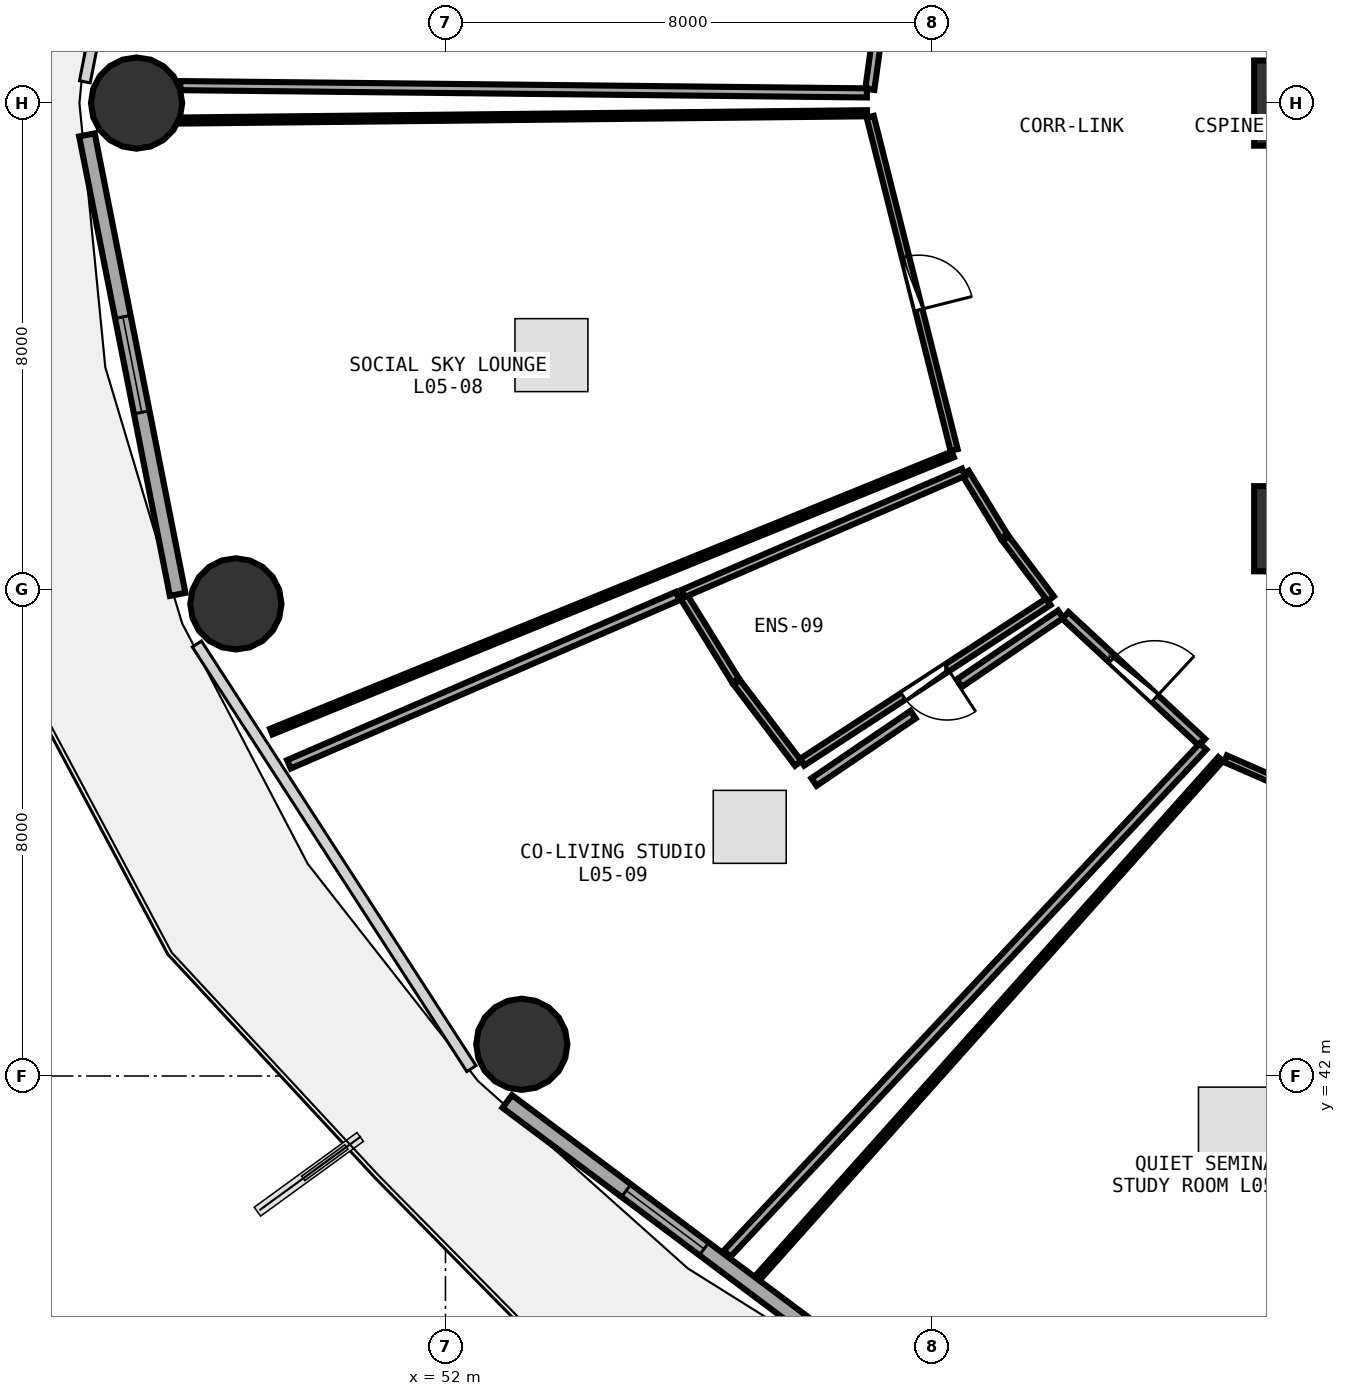
"""IFC4 building model, lengths in metres.
Left out: names, types, materials, properties, quantities, classifications, styles, units other than length and angle.
Written with IfcOpenShell. Run it as: python <this file> out.ifc"""

import sys

from ifc_helpers import new_model, si_unit, direction, frame, frame_2d, origin, origin_2d, place, context, subcontext, project, spatial, rectangle, circle, extrude, element, fill, save


model = new_model("IFC4")
c1 = context("Model", 3, precision=1e-05, world=origin(), true_north=direction((0.0, 1.0)))
c2 = subcontext(c1, "Body", "Model", "MODEL_VIEW")
j1 = project(units=[si_unit("LENGTHUNIT", "METRE"), si_unit("PLANEANGLEUNIT", "RADIAN")], contexts=[c1])
p1 = place(None, origin())
s1 = spatial("IfcSite", under=j1, at=p1, CompositionType="ELEMENT")
p2 = place(p1, origin())
s2 = spatial("IfcBuilding", under=s1, at=p2, CompositionType="ELEMENT")
p3 = place(p2, frame((0.0, 0.0, 22.5)))
s3 = spatial("IfcBuildingStorey", under=s2, at=p3, CompositionType="ELEMENT", Elevation=22.5)
for number, where, z_axis, x_axis in (
    (1, (66.0, 51.0, 0.0), (0.0, 0.0, 1.0), (1.0, 0.0, 0.0)),
    (2, (66.0, 58.0, 0.0), (0.0, 0.0, 1.0), (1.0, 0.0, 0.0)),
):
    element("IfcColumn", number, at=place(p3, frame(where, z_axis=z_axis, x_axis=x_axis)), inside=s3, PredefinedType="PILASTER", context=c2, shape_type="SweptSolid", body=[
        extrude(rectangle(XDim=1.4, YDim=1.4, at=origin_2d()), origin(), (0.0, 0.0, 1.0), 3.75),
    ])
for number, where, z_axis, x_axis in (
    (3, (46.92, 58.0, 0.0), (0.0, 0.0, 1.0), (1.0, 0.0, 0.0)),
    (4, (48.553, 49.764, 0.0), (0.0, 0.0, 1.0), (1.0, 0.0, 0.0)),
    (5, (53.256, 42.522, 0.0), (0.0, 0.0, 1.0), (1.0, 0.0, 0.0)),
):
    element("IfcColumn", number, at=place(p3, frame(where, z_axis=z_axis, x_axis=x_axis)), inside=s3, PredefinedType="COLUMN", context=c2, shape_type="SweptSolid", body=[
        extrude(circle(Radius=0.75, at=origin_2d()), origin(), (0.0, 0.0, 1.0), 3.75),
    ])
p4 = place(p3, frame((46.104, 57.477, 0.0), z_axis=(0.0, 0.0, 1.0), x_axis=(0.193726159581, -0.98105564322, 0.0)))
e6 = element("IfcWall", 6, at=p4, inside=s3, PredefinedType="SOLIDWALL", context=c2, shape_type="SweptSolid", body=[
    extrude(rectangle(XDim=7.703, YDim=0.26, at=frame_2d((3.851, 0.0))), origin(), (0.0, 0.0, 1.0), 3.475),
])
p5 = place(p4, frame((3.051, 0.0, 0.85)))
e7 = element("IfcOpeningElement", 7, at=p5, cuts=e6, PredefinedType="OPENING", context=c2, shape_type="SweptSolid", body=[
    extrude(rectangle(XDim=1.6, YDim=1.45, at=frame_2d((0.8, 0.725))), frame((0.0, 0.14, 0.0), z_axis=(0.0, -1.0, 0.0), x_axis=(1.0, 0.0, 0.0)), (0.0, 0.0, 1.0), 0.28),
])
p6 = place(p3, frame((53.016, 41.582, 0.0), z_axis=(0.0, 0.0, 1.0), x_axis=(0.80030733173, -0.599590005569, 0.0)))
e8 = element("IfcWall", 8, at=p6, inside=s3, PredefinedType="SOLIDWALL", context=c2, shape_type="SweptSolid", body=[
    extrude(rectangle(XDim=8.291, YDim=0.26, at=frame_2d((4.145, 0.0))), origin(), (0.0, 0.0, 1.0), 3.475),
])
p7 = place(p6, frame((2.445, 0.0, 0.85)))
e9 = element("IfcOpeningElement", 9, at=p7, cuts=e8, PredefinedType="OPENING", context=c2, shape_type="SweptSolid", body=[
    extrude(rectangle(XDim=1.6, YDim=1.45, at=frame_2d((0.8, 0.725))), frame((0.0, 0.14, 0.0), z_axis=(0.0, -1.0, 0.0), x_axis=(1.0, 0.0, 0.0)), (0.0, 0.0, 1.0), 0.28),
])
p8 = place(p3, frame((59.375, 61.115, 0.0), z_axis=(0.0, 0.0, 1.0), x_axis=(-0.135838186105, -0.990731036758, 0.0)))
e10 = element("IfcWall", 10, at=p8, inside=s3, PredefinedType="PARTITIONING", context=c2, shape_type="SweptSolid", body=[
    extrude(rectangle(XDim=2.915, YDim=0.15, at=frame_2d((1.458, 0.0))), origin(), (0.0, 0.0, 1.0), 3.48),
])
p9 = place(p8, frame((0.983, 0.0, 0.0)))
e11 = element("IfcOpeningElement", 11, at=p9, cuts=e10, PredefinedType="OPENING", context=c2, shape_type="SweptSolid", body=[
    extrude(rectangle(XDim=0.95, YDim=2.08, at=frame_2d((0.475, 1.04))), frame((0.0, 0.085, 0.0), z_axis=(0.0, -1.0, 0.0), x_axis=(1.0, 0.0, 0.0)), (0.0, 0.0, 1.0), 0.17),
])
p10 = place(p3, frame((58.986, 57.775, 0.0), z_axis=(0.0, 0.0, 1.0), x_axis=(0.244192294026, -0.969726829338, 0.0)))
e12 = element("IfcWall", 12, at=p10, inside=s3, PredefinedType="PARTITIONING", context=c2, shape_type="SweptSolid", body=[
    extrude(rectangle(XDim=5.651, YDim=0.12, at=frame_2d((2.825, 0.0))), origin(), (0.0, 0.0, 1.0), 3.48),
])
p11 = place(p10, frame((2.375, 0.0, 0.0)))
e13 = element("IfcOpeningElement", 13, at=p11, cuts=e12, PredefinedType="OPENING", context=c2, shape_type="SweptSolid", body=[
    extrude(rectangle(XDim=0.9, YDim=2.08, at=frame_2d((0.45, 1.04))), frame((0.0, 0.07, 0.0), z_axis=(0.0, -1.0, 0.0), x_axis=(1.0, 0.0, 0.0)), (0.0, 0.0, 1.0), 0.14),
])
p12 = place(p3, frame((61.917, 49.8, 0.0), z_axis=(0.0, 0.0, 1.0), x_axis=(-0.837796261941, -0.545982988267, 0.0)))
e14 = element("IfcWall", 14, at=p12, inside=s3, PredefinedType="PLUMBINGWALL", context=c2, shape_type="SweptSolid", body=[
    extrude(rectangle(XDim=4.838, YDim=0.13, at=frame_2d((2.419, 0.0))), origin(), (0.0, 0.0, 1.0), 3.235),
])
p13 = place(p12, frame((1.989, 0.0, 0.0)))
e15 = element("IfcOpeningElement", 15, at=p13, cuts=e14, PredefinedType="OPENING", context=c2, shape_type="SweptSolid", body=[
    extrude(rectangle(XDim=0.86, YDim=2.05, at=frame_2d((0.43, 1.025))), frame((0.0, 0.075, 0.0), z_axis=(0.0, -1.0, 0.0), x_axis=(1.0, 0.0, 0.0)), (0.0, 0.0, 1.0), 0.15),
])
p14 = place(p3, frame((62.194, 49.575, 0.0), z_axis=(0.0, 0.0, 1.0), x_axis=(0.7329267348, -0.680307578538, 0.0)))
e16 = element("IfcWall", 16, at=p14, inside=s3, PredefinedType="PARTITIONING", context=c2, shape_type="SweptSolid", body=[
    extrude(rectangle(XDim=3.067, YDim=0.15, at=frame_2d((1.533, 0.0))), origin(), (0.0, 0.0, 1.0), 2.875),
])
p15 = place(p14, frame((1.059, 0.0, 0.0)))
e17 = element("IfcOpeningElement", 17, at=p15, cuts=e16, PredefinedType="OPENING", context=c2, shape_type="SweptSolid", body=[
    extrude(rectangle(XDim=0.95, YDim=2.08, at=frame_2d((0.475, 1.04))), frame((0.0, 0.085, 0.0), z_axis=(0.0, -1.0, 0.0), x_axis=(1.0, 0.0, 0.0)), (0.0, 0.0, 1.0), 0.17),
])
p16 = place(p3, frame((64.828, 47.217, 0.0), z_axis=(0.0, 0.0, 1.0), x_axis=(0.916419655578, -0.400218708797, 0.0)))
e18 = element("IfcWall", 18, at=p16, inside=s3, PredefinedType="PARTITIONING", context=c2, shape_type="SweptSolid", body=[
    extrude(rectangle(XDim=6.104, YDim=0.12, at=frame_2d((3.052, 0.0))), origin(), (0.0, 0.0, 1.0), 2.875),
])
p17 = place(p16, frame((2.602, 0.0, 0.0)))
e19 = element("IfcOpeningElement", 19, at=p17, cuts=e18, PredefinedType="OPENING", context=c2, shape_type="SweptSolid", body=[
    extrude(rectangle(XDim=0.9, YDim=2.08, at=frame_2d((0.45, 1.04))), frame((0.0, 0.07, 0.0), z_axis=(0.0, -1.0, 0.0), x_axis=(1.0, 0.0, 0.0)), (0.0, 0.0, 1.0), 0.14),
])
p18 = place(p3, frame((58.931, 58.167, 0.0), z_axis=(0.0, 0.0, 1.0), x_axis=(-0.999943877154, 0.010594458135, 0.0)))
e20 = element("IfcWall", 20, at=p18, inside=s3, PredefinedType="PARTITIONING", context=c2, shape_type="SweptSolid", body=[
    extrude(rectangle(XDim=11.292, YDim=0.15, at=frame_2d((5.646, 0.0))), origin(), (0.0, 0.0, 1.0), 2.875),
])
p19 = place(p3, frame((60.343, 52.222, 0.0), z_axis=(0.0, 0.0, 1.0), x_axis=(-0.926333713065, -0.376703931542, 0.0)))
e21 = element("IfcWall", 21, at=p19, inside=s3, PredefinedType="PARTITIONING", context=c2, shape_type="SweptSolid", body=[
    extrude(rectangle(XDim=12.099, YDim=0.1, at=frame_2d((6.05, 0.0))), origin(), (0.0, 0.0, 1.0), 2.875),
])
p20 = place(p3, frame((47.64, 57.713, 0.0), z_axis=(0.0, 0.0, 1.0), x_axis=(0.999943877154, 0.010594458135, 0.0)))
e22 = element("IfcWall", 22, at=p20, inside=s3, PredefinedType="PARTITIONING", context=c2, shape_type="SweptSolid", body=[
    extrude(rectangle(XDim=11.292, YDim=0.1, at=frame_2d((5.646, 0.0))), origin(), (0.0, 0.0, 1.0), 2.875),
])
p21 = place(p3, frame((60.549, 51.92, 0.0), z_axis=(0.0, 0.0, 1.0), x_axis=(0.52146609248, -0.853272004928, 0.0)))
e23 = element("IfcWall", 23, at=p21, inside=s3, PredefinedType="PLUMBINGWALL", context=c2, shape_type="SweptSolid", body=[
    extrude(rectangle(XDim=1.228, YDim=0.13, at=frame_2d((0.614, 0.0))), origin(), (0.0, 0.0, 1.0), 3.48),
])
p22 = place(p3, frame((61.212, 50.839, 0.0), z_axis=(0.0, 0.0, 1.0), x_axis=(0.600347056143, -0.79973959023, 0.0)))
e24 = element("IfcWall", 24, at=p22, inside=s3, PredefinedType="PLUMBINGWALL", context=c2, shape_type="SweptSolid", body=[
    extrude(rectangle(XDim=1.238, YDim=0.13, at=frame_2d((0.619, 0.0))), origin(), (0.0, 0.0, 1.0), 2.875),
])
p23 = place(p3, frame((57.801, 47.142, 0.0), z_axis=(0.0, 0.0, 1.0), x_axis=(-0.60376191721, 0.797164692725, 0.0)))
e25 = element("IfcWall", 25, at=p23, inside=s3, PredefinedType="PLUMBINGWALL", context=c2, shape_type="SweptSolid", body=[
    extrude(rectangle(XDim=1.669, YDim=0.13, at=frame_2d((0.834, 0.0))), origin(), (0.0, 0.0, 1.0), 3.175),
])
p24 = place(p3, frame((56.771, 48.505, 0.0), z_axis=(0.0, 0.0, 1.0), x_axis=(-0.525540089642, 0.850768837099, 0.0)))
e26 = element("IfcWall", 26, at=p24, inside=s3, PredefinedType="PLUMBINGWALL", context=c2, shape_type="SweptSolid", body=[
    extrude(rectangle(XDim=1.651, YDim=0.13, at=frame_2d((0.826, 0.0))), origin(), (0.0, 0.0, 1.0), 3.175),
])
p25 = place(p3, frame((55.91, 49.935, 0.0), z_axis=(0.0, 0.0, 1.0), x_axis=(0.917797204715, 0.397049481826, 0.0)))
e27 = element("IfcWall", 27, at=p25, inside=s3, PredefinedType="PLUMBINGWALL", context=c2, shape_type="SweptSolid", body=[
    extrude(rectangle(XDim=5.023, YDim=0.13, at=frame_2d((2.511, 0.0))), origin(), (0.0, 0.0, 1.0), 2.875),
])
p26 = place(p3, frame((64.458, 47.419, 0.0), z_axis=(0.0, 0.0, 1.0), x_axis=(-0.684261294523, -0.729236916796, 0.0)))
e28 = element("IfcWall", 28, at=p26, inside=s3, PredefinedType="PARTITIONING", context=c2, shape_type="SweptSolid", body=[
    extrude(rectangle(XDim=11.438, YDim=0.15, at=frame_2d((5.719, 0.0))), origin(), (0.0, 0.0, 1.0), 2.875),
])
p27 = place(p3, frame((49.426, 47.126, 0.0), z_axis=(0.0, 0.0, 1.0), x_axis=(0.917736225937, 0.397190407239, 0.0)))
e29 = element("IfcWall", 29, at=p27, inside=s3, PredefinedType="PARTITIONING", context=c2, shape_type="SweptSolid", body=[
    extrude(rectangle(XDim=6.967, YDim=0.15, at=frame_2d((3.483, 0.0))), origin(), (0.0, 0.0, 1.0), 2.875),
])
p28 = place(p3, frame((58.061, 46.834, 0.0), z_axis=(0.0, 0.0, 1.0), x_axis=(0.826811291248, 0.562479411769, 0.0)))
e30 = element("IfcWall", 30, at=p28, inside=s3, PredefinedType="PARTITIONING", context=c2, shape_type="SweptSolid", body=[
    extrude(rectangle(XDim=1.971, YDim=0.15, at=frame_2d((0.985, 0.0))), origin(), (0.0, 0.0, 1.0), 3.48),
])
p29 = place(p3, frame((60.451, 48.461, 0.0), z_axis=(0.0, 0.0, 1.0), x_axis=(0.826867883695, 0.562396215237, 0.0)))
e31 = element("IfcWall", 31, at=p29, inside=s3, PredefinedType="PARTITIONING", context=c2, shape_type="SweptSolid", body=[
    extrude(rectangle(XDim=2.014, YDim=0.15, at=frame_2d((1.007, 0.0))), origin(), (0.0, 0.0, 1.0), 3.235),
])
p30 = place(p3, frame((57.156, 38.706, 0.0), z_axis=(0.0, 0.0, 1.0), x_axis=(0.66580890104, 0.746122313897, 0.0)))
e32 = element("IfcWall", 32, at=p30, inside=s3, PredefinedType="PARTITIONING", context=c2, shape_type="SweptSolid", body=[
    extrude(rectangle(XDim=11.399, YDim=0.1, at=frame_2d((5.7, 0.0))), origin(), (0.0, 0.0, 1.0), 2.875),
])
p31 = place(p5, origin())
e33 = element("IfcWindow", 33, at=p31, inside=s3, PartitioningType="SINGLE_PANEL", PredefinedType="WINDOW", context=c2, shape_type="SweptSolid", body=[
    extrude(rectangle(XDim=1.6, YDim=1.45, at=frame_2d((0.8, 0.725))), frame((0.0, 0.03, 0.0), z_axis=(0.0, -1.0, 0.0), x_axis=(1.0, 0.0, 0.0)), (0.0, 0.0, 1.0), 0.06),
])
fill(e7, e33)
p32 = place(p7, origin())
e34 = element("IfcWindow", 34, at=p32, inside=s3, PartitioningType="SINGLE_PANEL", PredefinedType="WINDOW", context=c2, shape_type="SweptSolid", body=[
    extrude(rectangle(XDim=1.6, YDim=1.45, at=frame_2d((0.8, 0.725))), frame((0.0, 0.03, 0.0), z_axis=(0.0, -1.0, 0.0), x_axis=(1.0, 0.0, 0.0)), (0.0, 0.0, 1.0), 0.06),
])
fill(e9, e34)
p33 = place(p11, origin())
e35 = element("IfcDoor", 35, at=p33, inside=s3, OperationType="SINGLE_SWING_RIGHT", PredefinedType="DOOR", context=c2, shape_type="SweptSolid", body=[
    extrude(rectangle(XDim=0.9, YDim=2.08, at=frame_2d((0.45, 1.04))), frame((0.0, 0.025, 0.0), z_axis=(0.0, -1.0, 0.0), x_axis=(1.0, 0.0, 0.0)), (0.0, 0.0, 1.0), 0.05),
])
fill(e13, e35)
p34 = place(p13, origin())
e36 = element("IfcDoor", 36, at=p34, inside=s3, OperationType="SINGLE_SWING_LEFT", PredefinedType="DOOR", context=c2, shape_type="SweptSolid", body=[
    extrude(rectangle(XDim=0.86, YDim=2.05, at=frame_2d((0.43, 1.025))), frame((0.0, 0.025, 0.0), z_axis=(0.0, -1.0, 0.0), x_axis=(1.0, 0.0, 0.0)), (0.0, 0.0, 1.0), 0.05),
])
fill(e15, e36)
p35 = place(p15, origin())
e37 = element("IfcDoor", 37, at=p35, inside=s3, OperationType="SINGLE_SWING_RIGHT", PredefinedType="DOOR", context=c2, shape_type="SweptSolid", body=[
    extrude(rectangle(XDim=0.95, YDim=2.08, at=frame_2d((0.475, 1.04))), frame((0.0, 0.025, 0.0), z_axis=(0.0, -1.0, 0.0), x_axis=(1.0, 0.0, 0.0)), (0.0, 0.0, 1.0), 0.05),
])
fill(e17, e37)
save(model, sys.argv[1])
